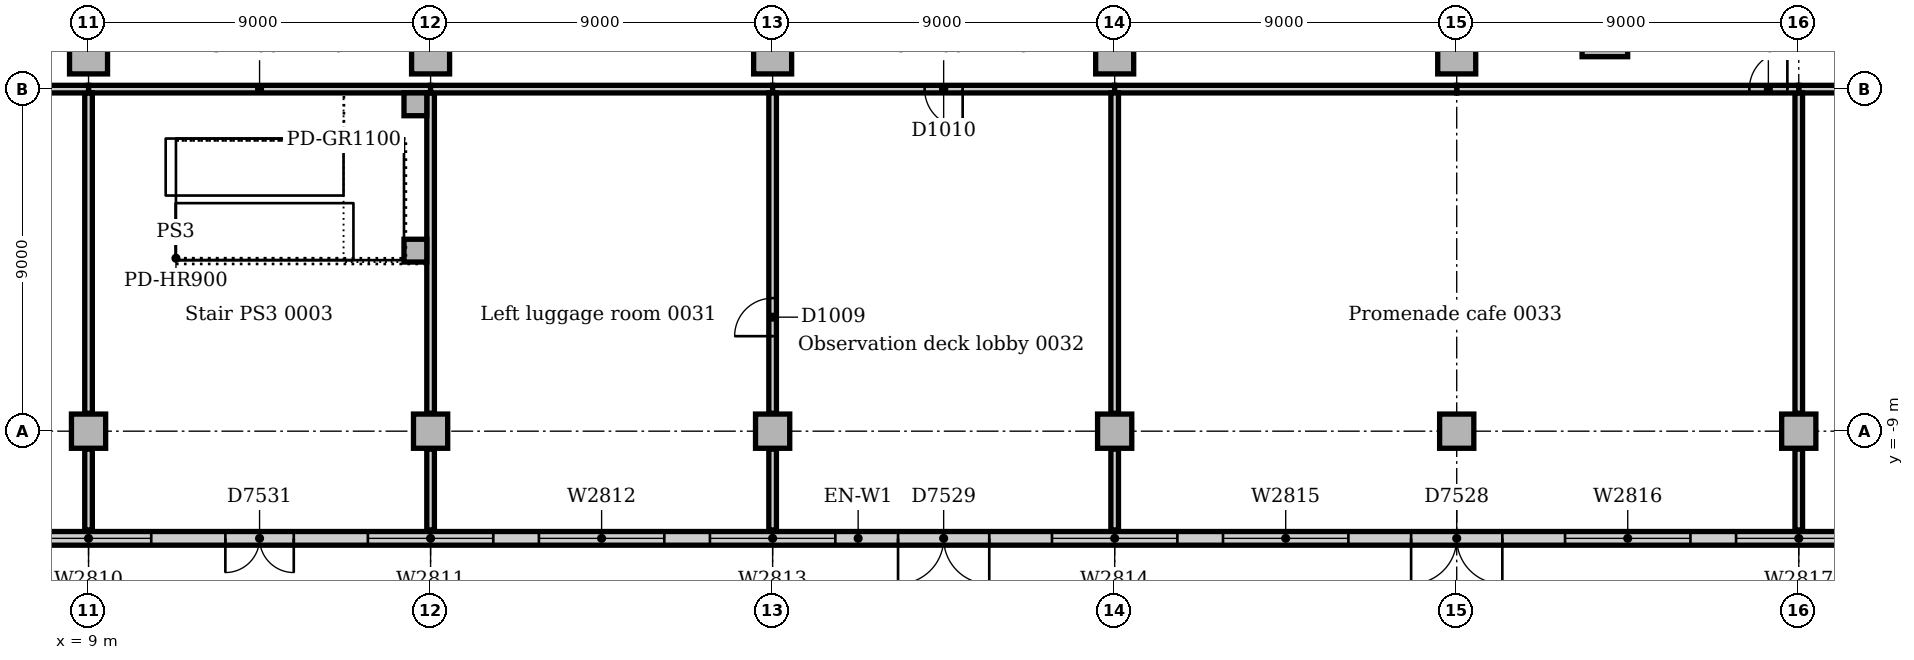
"""IFC4 building model, lengths in metres.
Left out: names, types, materials, properties, quantities, classifications, styles, units other than length and angle.
Written with IfcOpenShell. Run it as: python <this file> out.ifc"""

import sys

from ifc_helpers import new_model, si_unit, direction, frame, frame_2d, origin, origin_2d, place, context, subcontext, project, spatial, rectangle, extrude, element, fill, save


model = new_model("IFC4")
c1 = context("Model", 3, precision=1e-05, world=origin(), true_north=direction((0.0, 1.0)))
c2 = subcontext(c1, "Body", "Model", "MODEL_VIEW")
j1 = project(units=[si_unit("LENGTHUNIT", "METRE"), si_unit("PLANEANGLEUNIT", "RADIAN")], contexts=[c1])
p1 = place(None, origin())
s1 = spatial("IfcSite", under=j1, at=p1, CompositionType="ELEMENT")
p2 = place(p1, origin())
s2 = spatial("IfcBuilding", under=s1, at=p2, CompositionType="ELEMENT")
p3 = place(p2, origin())
s3 = spatial("IfcBuildingStorey", under=s2, at=p3, CompositionType="ELEMENT", Elevation=0.0)
p4 = place(p3, frame((48.898, 1.453, 0.0), z_axis=(0.0, 0.0, 1.0), x_axis=(1.0, 0.0, 0.0)))
e1 = element("IfcColumn", 1, at=p4, inside=s3, PredefinedType="COLUMN", context=c2, shape_type="SweptSolid", body=[
    extrude(rectangle(XDim=1.2, YDim=1.2, at=origin_2d()), origin(), (0.0, 0.0, 1.0), 5.7),
])
for number, where, z_axis, x_axis in (
    (2, (9.0, 0.9, 0.0), (0.0, 0.0, 1.0), (1.0, 0.0, 0.0)),
    (3, (18.0, 0.9, 0.0), (0.0, 0.0, 1.0), (1.0, 0.0, 0.0)),
    (4, (27.0, 0.9, 0.0), (0.0, 0.0, 1.0), (1.0, 0.0, 0.0)),
    (5, (36.0, 0.9, 0.0), (0.0, 0.0, 1.0), (1.0, 0.0, 0.0)),
    (6, (45.0, 0.9, 0.0), (0.0, 0.0, 1.0), (1.0, 0.0, 0.0)),
):
    element("IfcColumn", number, at=place(p3, frame(where, z_axis=z_axis, x_axis=x_axis)), inside=s3, PredefinedType="COLUMN", context=c2, shape_type="SweptSolid", body=[
        extrude(rectangle(XDim=1.0, YDim=1.0, at=origin_2d()), origin(), (0.0, 0.0, 1.0), 5.7),
    ])
for number, where, z_axis, x_axis in (
    (7, (9.0, -9.0, 0.0), (0.0, 0.0, 1.0), (1.0, 0.0, 0.0)),
    (8, (18.0, -9.0, 0.0), (0.0, 0.0, 1.0), (1.0, 0.0, 0.0)),
    (9, (27.0, -9.0, 0.0), (0.0, 0.0, 1.0), (1.0, 0.0, 0.0)),
    (10, (36.0, -9.0, 0.0), (0.0, 0.0, 1.0), (1.0, 0.0, 0.0)),
    (11, (45.0, -9.0, 0.0), (0.0, 0.0, 1.0), (1.0, 0.0, 0.0)),
    (12, (54.0, -9.0, 0.0), (0.0, 0.0, 1.0), (1.0, 0.0, 0.0)),
):
    element("IfcColumn", number, at=place(p3, frame(where, z_axis=z_axis, x_axis=x_axis)), inside=s3, PredefinedType="COLUMN", context=c2, shape_type="SweptSolid", body=[
        extrude(rectangle(XDim=0.9, YDim=0.9, at=origin_2d()), origin(), (0.0, 0.0, 1.0), 5.7),
    ])
p5 = place(p3, frame((-4.5, -11.82, 0.0), z_axis=(0.0, 0.0, 1.0), x_axis=(1.0, 0.0, 0.0)))
e13 = element("IfcWall", 13, at=p5, inside=s3, PredefinedType="STANDARD", context=c2, shape_type="SweptSolid", body=[
    extrude(rectangle(XDim=67.5, YDim=0.36, at=frame_2d((33.75, 0.0))), origin(), (0.0, 0.0, 1.0), 5.7),
])
p6 = place(p5, frame((1.05, 0.0, 0.0)))
e14 = element("IfcOpeningElement", 14, at=p6, cuts=e13, PredefinedType="OPENING", context=c2, shape_type="SweptSolid", body=[
    extrude(rectangle(XDim=2.4, YDim=2.4, at=frame_2d((1.2, 1.2))), frame((0.0, 0.19, 0.0), z_axis=(0.0, -1.0, 0.0), x_axis=(1.0, 0.0, 0.0)), (0.0, 0.0, 1.0), 0.38),
])
p7 = place(p5, frame((48.3, 0.0, 0.0)))
e15 = element("IfcOpeningElement", 15, at=p7, cuts=e13, PredefinedType="OPENING", context=c2, shape_type="SweptSolid", body=[
    extrude(rectangle(XDim=2.4, YDim=2.4, at=frame_2d((1.2, 1.2))), frame((0.0, 0.19, 0.0), z_axis=(0.0, -1.0, 0.0), x_axis=(1.0, 0.0, 0.0)), (0.0, 0.0, 1.0), 0.38),
])
p8 = place(p5, frame((34.8, 0.0, 0.0)))
e16 = element("IfcOpeningElement", 16, at=p8, cuts=e13, PredefinedType="OPENING", context=c2, shape_type="SweptSolid", body=[
    extrude(rectangle(XDim=2.4, YDim=2.4, at=frame_2d((1.2, 1.2))), frame((0.0, 0.19, 0.0), z_axis=(0.0, -1.0, 0.0), x_axis=(1.0, 0.0, 0.0)), (0.0, 0.0, 1.0), 0.38),
])
p9 = place(p5, frame((7.8, 0.0, 0.0)))
e17 = element("IfcOpeningElement", 17, at=p9, cuts=e13, PredefinedType="OPENING", context=c2, shape_type="SweptSolid", body=[
    extrude(rectangle(XDim=2.4, YDim=2.4, at=frame_2d((1.2, 1.2))), frame((0.0, 0.19, 0.0), z_axis=(0.0, -1.0, 0.0), x_axis=(1.0, 0.0, 0.0)), (0.0, 0.0, 1.0), 0.38),
])
p10 = place(p5, frame((17.1, 0.0, 0.0)))
e18 = element("IfcOpeningElement", 18, at=p10, cuts=e13, PredefinedType="OPENING", context=c2, shape_type="SweptSolid", body=[
    extrude(rectangle(XDim=1.8, YDim=2.2, at=frame_2d((0.9, 1.1))), frame((0.0, 0.19, 0.0), z_axis=(0.0, -1.0, 0.0), x_axis=(1.0, 0.0, 0.0)), (0.0, 0.0, 1.0), 0.38),
])
p11 = place(p5, frame((63.6, 0.0, 0.0)))
e19 = element("IfcOpeningElement", 19, at=p11, cuts=e13, PredefinedType="OPENING", context=c2, shape_type="SweptSolid", body=[
    extrude(rectangle(XDim=1.8, YDim=2.2, at=frame_2d((0.9, 1.1))), frame((0.0, 0.19, 0.0), z_axis=(0.0, -1.0, 0.0), x_axis=(1.0, 0.0, 0.0)), (0.0, 0.0, 1.0), 0.38),
])
p12 = place(p5, frame((11.85, 0.0, 0.6)))
e20 = element("IfcOpeningElement", 20, at=p12, cuts=e13, PredefinedType="OPENING", context=c2, shape_type="SweptSolid", body=[
    extrude(rectangle(XDim=3.3, YDim=3.0, at=frame_2d((1.65, 1.5))), frame((0.0, 0.19, 0.0), z_axis=(0.0, -1.0, 0.0), x_axis=(1.0, 0.0, 0.0)), (0.0, 0.0, 1.0), 0.38),
])
p13 = place(p5, frame((20.85, 0.0, 0.6)))
e21 = element("IfcOpeningElement", 21, at=p13, cuts=e13, PredefinedType="OPENING", context=c2, shape_type="SweptSolid", body=[
    extrude(rectangle(XDim=3.3, YDim=3.0, at=frame_2d((1.65, 1.5))), frame((0.0, 0.19, 0.0), z_axis=(0.0, -1.0, 0.0), x_axis=(1.0, 0.0, 0.0)), (0.0, 0.0, 1.0), 0.38),
])
p14 = place(p5, frame((25.35, 0.0, 0.6)))
e22 = element("IfcOpeningElement", 22, at=p14, cuts=e13, PredefinedType="OPENING", context=c2, shape_type="SweptSolid", body=[
    extrude(rectangle(XDim=3.3, YDim=3.0, at=frame_2d((1.65, 1.5))), frame((0.0, 0.19, 0.0), z_axis=(0.0, -1.0, 0.0), x_axis=(1.0, 0.0, 0.0)), (0.0, 0.0, 1.0), 0.38),
])
p15 = place(p5, frame((29.85, 0.0, 0.6)))
e23 = element("IfcOpeningElement", 23, at=p15, cuts=e13, PredefinedType="OPENING", context=c2, shape_type="SweptSolid", body=[
    extrude(rectangle(XDim=3.3, YDim=3.0, at=frame_2d((1.65, 1.5))), frame((0.0, 0.19, 0.0), z_axis=(0.0, -1.0, 0.0), x_axis=(1.0, 0.0, 0.0)), (0.0, 0.0, 1.0), 0.38),
])
p16 = place(p5, frame((38.85, 0.0, 0.6)))
e24 = element("IfcOpeningElement", 24, at=p16, cuts=e13, PredefinedType="OPENING", context=c2, shape_type="SweptSolid", body=[
    extrude(rectangle(XDim=3.3, YDim=3.0, at=frame_2d((1.65, 1.5))), frame((0.0, 0.19, 0.0), z_axis=(0.0, -1.0, 0.0), x_axis=(1.0, 0.0, 0.0)), (0.0, 0.0, 1.0), 0.38),
])
p17 = place(p5, frame((43.35, 0.0, 0.6)))
e25 = element("IfcOpeningElement", 25, at=p17, cuts=e13, PredefinedType="OPENING", context=c2, shape_type="SweptSolid", body=[
    extrude(rectangle(XDim=3.3, YDim=3.0, at=frame_2d((1.65, 1.5))), frame((0.0, 0.19, 0.0), z_axis=(0.0, -1.0, 0.0), x_axis=(1.0, 0.0, 0.0)), (0.0, 0.0, 1.0), 0.38),
])
p18 = place(p5, frame((52.35, 0.0, 0.6)))
e26 = element("IfcOpeningElement", 26, at=p18, cuts=e13, PredefinedType="OPENING", context=c2, shape_type="SweptSolid", body=[
    extrude(rectangle(XDim=3.3, YDim=3.0, at=frame_2d((1.65, 1.5))), frame((0.0, 0.19, 0.0), z_axis=(0.0, -1.0, 0.0), x_axis=(1.0, 0.0, 0.0)), (0.0, 0.0, 1.0), 0.38),
])
p19 = place(p5, frame((56.85, 0.0, 0.6)))
e27 = element("IfcOpeningElement", 27, at=p19, cuts=e13, PredefinedType="OPENING", context=c2, shape_type="SweptSolid", body=[
    extrude(rectangle(XDim=3.3, YDim=3.0, at=frame_2d((1.65, 1.5))), frame((0.0, 0.19, 0.0), z_axis=(0.0, -1.0, 0.0), x_axis=(1.0, 0.0, 0.0)), (0.0, 0.0, 1.0), 0.38),
])
for number, where, z_axis, x_axis in (
    (28, (17.6, -4.25, 0.0), (0.0, 0.0, 1.0), (1.0, 0.0, 0.0)),
    (29, (17.6, -0.4, 0.0), (0.0, 0.0, 1.0), (1.0, 0.0, 0.0)),
):
    element("IfcColumn", number, at=place(p3, frame(where, z_axis=z_axis, x_axis=x_axis)), inside=s3, PredefinedType="COLUMN", context=c2, shape_type="SweptSolid", body=[
        extrude(rectangle(XDim=0.6, YDim=0.6, at=origin_2d()), origin(), (0.0, 0.0, 1.0), 6.0),
    ])
p20 = place(p3, frame((9.0, 0.0, 0.0), z_axis=(0.0, 0.0, 1.0), x_axis=(1.0, 0.0, 0.0)))
e30 = element("IfcWall", 30, at=p20, inside=s3, PredefinedType="SOLIDWALL", context=c2, shape_type="SweptSolid", body=[
    extrude(rectangle(XDim=9.0, YDim=0.2, at=frame_2d((4.5, 0.0))), origin(), (0.0, 0.0, 1.0), 5.7),
])
p21 = place(p3, frame((9.0, -11.6, 0.0), z_axis=(0.0, 0.0, 1.0), x_axis=(0.0, 1.0, 0.0)))
e31 = element("IfcWall", 31, at=p21, inside=s3, PredefinedType="SOLIDWALL", context=c2, shape_type="SweptSolid", body=[
    extrude(rectangle(XDim=2.13, YDim=0.2, at=frame_2d((1.065, 0.0))), origin(), (0.0, 0.0, 1.0), 5.7),
])
p22 = place(p3, frame((9.0, -8.53, 0.0), z_axis=(0.0, 0.0, 1.0), x_axis=(0.0, 1.0, 0.0)))
e32 = element("IfcWall", 32, at=p22, inside=s3, PredefinedType="SOLIDWALL", context=c2, shape_type="SweptSolid", body=[
    extrude(rectangle(XDim=8.43, YDim=0.2, at=frame_2d((4.215, 0.0))), origin(), (0.0, 0.0, 1.0), 5.7),
])
p23 = place(p3, frame((18.0, -11.6, 0.0), z_axis=(0.0, 0.0, 1.0), x_axis=(0.0, 1.0, 0.0)))
e33 = element("IfcWall", 33, at=p23, inside=s3, PredefinedType="SOLIDWALL", context=c2, shape_type="SweptSolid", body=[
    extrude(rectangle(XDim=2.13, YDim=0.2, at=frame_2d((1.065, 0.0))), origin(), (0.0, 0.0, 1.0), 5.7),
])
p24 = place(p3, frame((18.0, -8.53, 0.0), z_axis=(0.0, 0.0, 1.0), x_axis=(0.0, 1.0, 0.0)))
e34 = element("IfcWall", 34, at=p24, inside=s3, PredefinedType="SOLIDWALL", context=c2, shape_type="SweptSolid", body=[
    extrude(rectangle(XDim=8.43, YDim=0.2, at=frame_2d((4.215, 0.0))), origin(), (0.0, 0.0, 1.0), 5.7),
])
p25 = place(p3, frame((54.0, 0.0, 0.0), z_axis=(0.0, 0.0, 1.0), x_axis=(1.0, 0.0, 0.0)))
e35 = element("IfcWall", 35, at=p25, inside=s3, PredefinedType="SOLIDWALL", context=c2, shape_type="SweptSolid", body=[
    extrude(rectangle(XDim=8.53, YDim=0.2, at=frame_2d((4.265, 0.0))), origin(), (0.0, 0.0, 1.0), 5.7),
])
p26 = place(p3, frame((54.0, -11.6, 0.0), z_axis=(0.0, 0.0, 1.0), x_axis=(0.0, 1.0, 0.0)))
e36 = element("IfcWall", 36, at=p26, inside=s3, PredefinedType="SOLIDWALL", context=c2, shape_type="SweptSolid", body=[
    extrude(rectangle(XDim=2.13, YDim=0.2, at=frame_2d((1.065, 0.0))), origin(), (0.0, 0.0, 1.0), 5.7),
])
p27 = place(p3, frame((54.0, -8.53, 0.0), z_axis=(0.0, 0.0, 1.0), x_axis=(0.0, 1.0, 0.0)))
e37 = element("IfcWall", 37, at=p27, inside=s3, PredefinedType="SOLIDWALL", context=c2, shape_type="SweptSolid", body=[
    extrude(rectangle(XDim=8.43, YDim=0.2, at=frame_2d((4.215, 0.0))), origin(), (0.0, 0.0, 1.0), 5.7),
])
p28 = place(p3, frame((-0.1, 0.0, 0.0), z_axis=(0.0, 0.0, 1.0), x_axis=(1.0, 0.0, 0.0)))
e38 = element("IfcWall", 38, at=p28, inside=s3, PredefinedType="PARTITIONING", context=c2, shape_type="SweptSolid", body=[
    extrude(rectangle(XDim=9.1, YDim=0.2, at=frame_2d((4.55, 0.0))), origin(), (0.0, 0.0, 1.0), 5.7),
])
p29 = place(p3, frame((18.0, 0.0, 0.0), z_axis=(0.0, 0.0, 1.0), x_axis=(1.0, 0.0, 0.0)))
e39 = element("IfcWall", 39, at=p29, inside=s3, PredefinedType="PARTITIONING", context=c2, shape_type="SweptSolid", body=[
    extrude(rectangle(XDim=9.0, YDim=0.2, at=frame_2d((4.5, 0.0))), origin(), (0.0, 0.0, 1.0), 5.7),
])
p30 = place(p3, frame((27.0, 0.0, 0.0), z_axis=(0.0, 0.0, 1.0), x_axis=(1.0, 0.0, 0.0)))
e40 = element("IfcWall", 40, at=p30, inside=s3, PredefinedType="PARTITIONING", context=c2, shape_type="SweptSolid", body=[
    extrude(rectangle(XDim=9.0, YDim=0.2, at=frame_2d((4.5, 0.0))), origin(), (0.0, 0.0, 1.0), 5.7),
])
p31 = place(p30, frame((4.0, 0.0, 0.0)))
e41 = element("IfcOpeningElement", 41, at=p31, cuts=e40, PredefinedType="OPENING", context=c2, shape_type="SweptSolid", body=[
    extrude(rectangle(XDim=1.0, YDim=2.1, at=frame_2d((0.5, 1.05))), frame((0.0, 0.11, 0.0), z_axis=(0.0, -1.0, 0.0), x_axis=(1.0, 0.0, 0.0)), (0.0, 0.0, 1.0), 0.22),
])
p32 = place(p3, frame((45.0, 0.0, 0.0), z_axis=(0.0, 0.0, 1.0), x_axis=(1.0, 0.0, 0.0)))
e42 = element("IfcWall", 42, at=p32, inside=s3, PredefinedType="PARTITIONING", context=c2, shape_type="SweptSolid", body=[
    extrude(rectangle(XDim=9.0, YDim=0.2, at=frame_2d((4.5, 0.0))), origin(), (0.0, 0.0, 1.0), 5.7),
])
p33 = place(p32, frame((7.7, 0.0, 0.0)))
e43 = element("IfcOpeningElement", 43, at=p33, cuts=e42, PredefinedType="OPENING", context=c2, shape_type="SweptSolid", body=[
    extrude(rectangle(XDim=1.0, YDim=2.1, at=frame_2d((0.5, 1.05))), frame((0.0, 0.11, 0.0), z_axis=(0.0, -1.0, 0.0), x_axis=(1.0, 0.0, 0.0)), (0.0, 0.0, 1.0), 0.22),
])
p34 = place(p3, frame((36.0, 0.0, 0.0), z_axis=(0.0, 0.0, 1.0), x_axis=(1.0, 0.0, 0.0)))
e44 = element("IfcWall", 44, at=p34, inside=s3, PredefinedType="PARTITIONING", context=c2, shape_type="SweptSolid", body=[
    extrude(rectangle(XDim=9.0, YDim=0.2, at=frame_2d((4.5, 0.0))), origin(), (0.0, 0.0, 1.0), 5.7),
])
p35 = place(p3, frame((27.0, -11.6, 0.0), z_axis=(0.0, 0.0, 1.0), x_axis=(0.0, 1.0, 0.0)))
e45 = element("IfcWall", 45, at=p35, inside=s3, PredefinedType="PARTITIONING", context=c2, shape_type="SweptSolid", body=[
    extrude(rectangle(XDim=2.13, YDim=0.2, at=frame_2d((1.065, 0.0))), origin(), (0.0, 0.0, 1.0), 5.7),
])
p36 = place(p3, frame((27.0, -8.53, 0.0), z_axis=(0.0, 0.0, 1.0), x_axis=(0.0, 1.0, 0.0)))
e46 = element("IfcWall", 46, at=p36, inside=s3, PredefinedType="PARTITIONING", context=c2, shape_type="SweptSolid", body=[
    extrude(rectangle(XDim=8.43, YDim=0.2, at=frame_2d((4.215, 0.0))), origin(), (0.0, 0.0, 1.0), 5.7),
])
p37 = place(p36, frame((2.03, 0.0, 0.0)))
e47 = element("IfcOpeningElement", 47, at=p37, cuts=e46, PredefinedType="OPENING", context=c2, shape_type="SweptSolid", body=[
    extrude(rectangle(XDim=1.0, YDim=2.1, at=frame_2d((0.5, 1.05))), frame((0.0, 0.11, 0.0), z_axis=(0.0, -1.0, 0.0), x_axis=(1.0, 0.0, 0.0)), (0.0, 0.0, 1.0), 0.22),
])
p38 = place(p3, frame((36.0, -11.6, 0.0), z_axis=(0.0, 0.0, 1.0), x_axis=(0.0, 1.0, 0.0)))
e48 = element("IfcWall", 48, at=p38, inside=s3, PredefinedType="PARTITIONING", context=c2, shape_type="SweptSolid", body=[
    extrude(rectangle(XDim=2.13, YDim=0.2, at=frame_2d((1.065, 0.0))), origin(), (0.0, 0.0, 1.0), 5.7),
])
p39 = place(p3, frame((36.0, -8.53, 0.0), z_axis=(0.0, 0.0, 1.0), x_axis=(0.0, 1.0, 0.0)))
e49 = element("IfcWall", 49, at=p39, inside=s3, PredefinedType="PARTITIONING", context=c2, shape_type="SweptSolid", body=[
    extrude(rectangle(XDim=8.43, YDim=0.2, at=frame_2d((4.215, 0.0))), origin(), (0.0, 0.0, 1.0), 5.7),
])
p40 = place(p7, frame((2.4, 0.0, 0.0), z_axis=(0.0, 0.0, 1.0), x_axis=(-1.0, 0.0, 0.0)))
e50 = element("IfcDoor", 50, at=p40, inside=s3, OperationType="DOUBLE_DOOR_SINGLE_SWING", PredefinedType="DOOR", context=c2, shape_type="SweptSolid", body=[
    extrude(rectangle(XDim=2.4, YDim=2.4, at=frame_2d((1.2, 1.2))), frame((0.0, -0.07, 0.0), z_axis=(0.0, -1.0, 0.0), x_axis=(1.0, 0.0, 0.0)), (0.0, 0.0, 1.0), 0.05),
])
fill(e15, e50)
p41 = place(p8, frame((2.4, 0.0, 0.0), z_axis=(0.0, 0.0, 1.0), x_axis=(-1.0, 0.0, 0.0)))
e51 = element("IfcDoor", 51, at=p41, inside=s3, OperationType="DOUBLE_DOOR_SINGLE_SWING", PredefinedType="DOOR", context=c2, shape_type="SweptSolid", body=[
    extrude(rectangle(XDim=2.4, YDim=2.4, at=frame_2d((1.2, 1.2))), frame((0.0, -0.07, 0.0), z_axis=(0.0, -1.0, 0.0), x_axis=(1.0, 0.0, 0.0)), (0.0, 0.0, 1.0), 0.05),
])
fill(e16, e51)
p42 = place(p10, frame((1.8, 0.0, 0.0), z_axis=(0.0, 0.0, 1.0), x_axis=(-1.0, 0.0, 0.0)))
e52 = element("IfcDoor", 52, at=p42, inside=s3, OperationType="DOUBLE_DOOR_SINGLE_SWING", PredefinedType="DOOR", context=c2, shape_type="SweptSolid", body=[
    extrude(rectangle(XDim=1.8, YDim=2.2, at=frame_2d((0.9, 1.1))), frame((0.0, -0.07, 0.0), z_axis=(0.0, -1.0, 0.0), x_axis=(1.0, 0.0, 0.0)), (0.0, 0.0, 1.0), 0.05),
])
fill(e18, e52)
p43 = place(p12, origin())
e53 = element("IfcWindow", 53, at=p43, inside=s3, PartitioningType="SINGLE_PANEL", PredefinedType="WINDOW", context=c2, shape_type="SweptSolid", body=[
    extrude(rectangle(XDim=3.3, YDim=3.0, at=frame_2d((1.65, 1.5))), frame((0.0, 0.13, 0.0), z_axis=(0.0, -1.0, 0.0), x_axis=(1.0, 0.0, 0.0)), (0.0, 0.0, 1.0), 0.06),
])
fill(e20, e53)
p44 = place(p13, origin())
e54 = element("IfcWindow", 54, at=p44, inside=s3, PartitioningType="SINGLE_PANEL", PredefinedType="WINDOW", context=c2, shape_type="SweptSolid", body=[
    extrude(rectangle(XDim=3.3, YDim=3.0, at=frame_2d((1.65, 1.5))), frame((0.0, 0.13, 0.0), z_axis=(0.0, -1.0, 0.0), x_axis=(1.0, 0.0, 0.0)), (0.0, 0.0, 1.0), 0.06),
])
fill(e21, e54)
p45 = place(p14, origin())
e55 = element("IfcWindow", 55, at=p45, inside=s3, PartitioningType="SINGLE_PANEL", PredefinedType="WINDOW", context=c2, shape_type="SweptSolid", body=[
    extrude(rectangle(XDim=3.3, YDim=3.0, at=frame_2d((1.65, 1.5))), frame((0.0, 0.13, 0.0), z_axis=(0.0, -1.0, 0.0), x_axis=(1.0, 0.0, 0.0)), (0.0, 0.0, 1.0), 0.06),
])
fill(e22, e55)
p46 = place(p15, origin())
e56 = element("IfcWindow", 56, at=p46, inside=s3, PartitioningType="SINGLE_PANEL", PredefinedType="WINDOW", context=c2, shape_type="SweptSolid", body=[
    extrude(rectangle(XDim=3.3, YDim=3.0, at=frame_2d((1.65, 1.5))), frame((0.0, 0.13, 0.0), z_axis=(0.0, -1.0, 0.0), x_axis=(1.0, 0.0, 0.0)), (0.0, 0.0, 1.0), 0.06),
])
fill(e23, e56)
p47 = place(p16, origin())
e57 = element("IfcWindow", 57, at=p47, inside=s3, PartitioningType="SINGLE_PANEL", PredefinedType="WINDOW", context=c2, shape_type="SweptSolid", body=[
    extrude(rectangle(XDim=3.3, YDim=3.0, at=frame_2d((1.65, 1.5))), frame((0.0, 0.13, 0.0), z_axis=(0.0, -1.0, 0.0), x_axis=(1.0, 0.0, 0.0)), (0.0, 0.0, 1.0), 0.06),
])
fill(e24, e57)
p48 = place(p17, origin())
e58 = element("IfcWindow", 58, at=p48, inside=s3, PartitioningType="SINGLE_PANEL", PredefinedType="WINDOW", context=c2, shape_type="SweptSolid", body=[
    extrude(rectangle(XDim=3.3, YDim=3.0, at=frame_2d((1.65, 1.5))), frame((0.0, 0.13, 0.0), z_axis=(0.0, -1.0, 0.0), x_axis=(1.0, 0.0, 0.0)), (0.0, 0.0, 1.0), 0.06),
])
fill(e25, e58)
p49 = place(p18, origin())
e59 = element("IfcWindow", 59, at=p49, inside=s3, PartitioningType="SINGLE_PANEL", PredefinedType="WINDOW", context=c2, shape_type="SweptSolid", body=[
    extrude(rectangle(XDim=3.3, YDim=3.0, at=frame_2d((1.65, 1.5))), frame((0.0, 0.13, 0.0), z_axis=(0.0, -1.0, 0.0), x_axis=(1.0, 0.0, 0.0)), (0.0, 0.0, 1.0), 0.06),
])
fill(e26, e59)
p50 = place(p19, origin())
e60 = element("IfcWindow", 60, at=p50, inside=s3, PartitioningType="SINGLE_PANEL", PredefinedType="WINDOW", context=c2, shape_type="SweptSolid", body=[
    extrude(rectangle(XDim=3.3, YDim=3.0, at=frame_2d((1.65, 1.5))), frame((0.0, 0.13, 0.0), z_axis=(0.0, -1.0, 0.0), x_axis=(1.0, 0.0, 0.0)), (0.0, 0.0, 1.0), 0.06),
])
fill(e27, e60)
p51 = place(p37, origin())
e61 = element("IfcDoor", 61, at=p51, inside=s3, OperationType="SINGLE_SWING_LEFT", PredefinedType="DOOR", context=c2, shape_type="SweptSolid", body=[
    extrude(rectangle(XDim=1.0, YDim=2.1, at=frame_2d((0.5, 1.05))), frame((0.0, 0.025, 0.0), z_axis=(0.0, -1.0, 0.0), x_axis=(1.0, 0.0, 0.0)), (0.0, 0.0, 1.0), 0.05),
])
fill(e47, e61)
p52 = place(p31, frame((1.0, 0.0, 0.0), z_axis=(0.0, 0.0, 1.0), x_axis=(-1.0, 0.0, 0.0)))
e62 = element("IfcDoor", 62, at=p52, inside=s3, OperationType="SINGLE_SWING_LEFT", PredefinedType="DOOR", context=c2, shape_type="SweptSolid", body=[
    extrude(rectangle(XDim=1.0, YDim=2.1, at=frame_2d((0.5, 1.05))), frame((0.0, 0.025, 0.0), z_axis=(0.0, -1.0, 0.0), x_axis=(1.0, 0.0, 0.0)), (0.0, 0.0, 1.0), 0.05),
])
fill(e41, e62)
p53 = place(p33, origin())
e63 = element("IfcDoor", 63, at=p53, inside=s3, OperationType="SINGLE_SWING_RIGHT", PredefinedType="DOOR", context=c2, shape_type="SweptSolid", body=[
    extrude(rectangle(XDim=1.0, YDim=2.1, at=frame_2d((0.5, 1.05))), frame((0.0, 0.025, 0.0), z_axis=(0.0, -1.0, 0.0), x_axis=(1.0, 0.0, 0.0)), (0.0, 0.0, 1.0), 0.05),
])
fill(e43, e63)
save(model, sys.argv[1])
